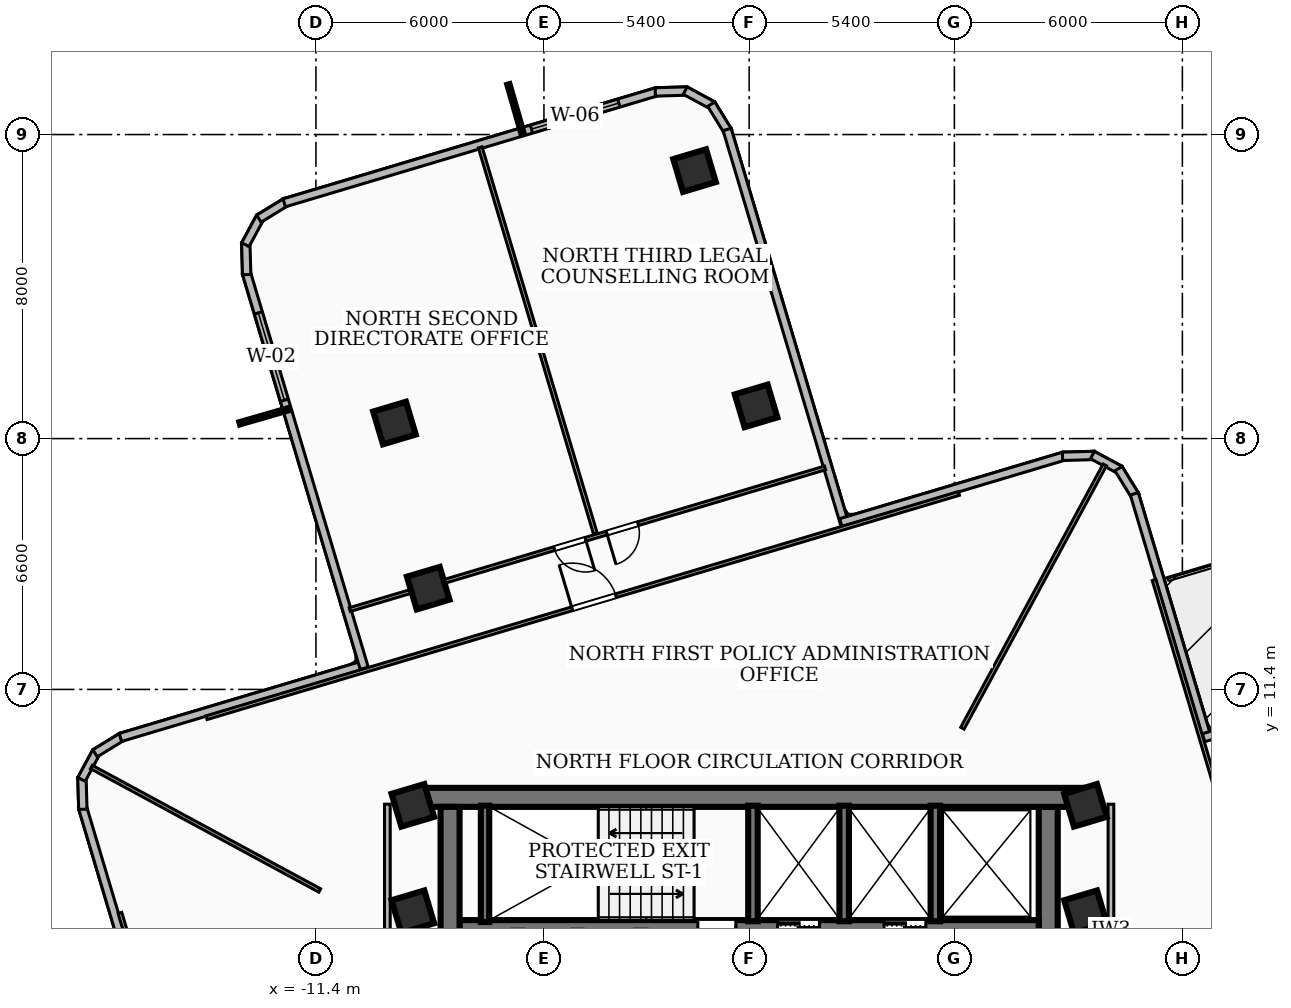
"""IFC4 building model, lengths in metres.
Left out: names, types, materials, properties, quantities, classifications, styles, units other than length and angle.
Written with IfcOpenShell. Run it as: python <this file> out.ifc"""

import sys

from ifc_helpers import new_model, si_unit, direction, frame, frame_2d, origin, origin_2d, place, context, subcontext, project, spatial, rectangle, extrude, element, fill, save


model = new_model("IFC4")
c1 = context("Model", 3, precision=1e-05, world=origin(), true_north=direction((0.0, 1.0)))
c2 = subcontext(c1, "Body", "Model", "MODEL_VIEW")
j1 = project(units=[si_unit("LENGTHUNIT", "METRE"), si_unit("PLANEANGLEUNIT", "RADIAN")], contexts=[c1])
p1 = place(None, origin())
s1 = spatial("IfcSite", under=j1, at=p1, CompositionType="ELEMENT")
p2 = place(p1, origin())
s2 = spatial("IfcBuilding", under=s1, at=p2, CompositionType="ELEMENT")
p3 = place(p2, frame((0.0, 0.0, 145.08)))
s3 = spatial("IfcBuildingStorey", under=s2, at=p3, CompositionType="ELEMENT", Elevation=145.08)
p4 = place(p3, frame((-8.78, 8.56, 0.0), z_axis=(0.0, 0.0, 1.0), x_axis=(1.0, 0.0, 0.0)))
e1 = element("IfcWall", 1, at=p4, inside=s3, PredefinedType="SHEAR", context=c2, shape_type="SweptSolid", body=[
    extrude(rectangle(XDim=17.56, YDim=0.5, at=frame_2d((8.78, 0.0))), origin(), (0.0, 0.0, 1.0), 3.32),
])
for number, where, z_axis, x_axis in (
    (2, (-7.87, 2.0, 0.0), (0.0, 0.0, 1.0), (0.0, 1.0, 0.0)),
    (3, (7.87, 8.31, 0.0), (0.0, 0.0, 1.0), (0.0, -1.0, 0.0)),
):
    element("IfcWall", number, at=place(p3, frame(where, z_axis=z_axis, x_axis=x_axis)), inside=s3, PredefinedType="SHEAR", context=c2, shape_type="SweptSolid", body=[
        extrude(rectangle(XDim=6.31, YDim=0.5, at=frame_2d((3.155, 0.0))), origin(), (0.0, 0.0, 1.0), 3.32),
    ])
p5 = place(p3, frame((7.62, 5.18, 0.0), z_axis=(0.0, 0.0, 1.0), x_axis=(-1.0, 0.0, 0.0)))
e4 = element("IfcWall", 4, at=p5, inside=s3, PredefinedType="SOLIDWALL", context=c2, shape_type="SweptSolid", body=[
    extrude(rectangle(XDim=15.24, YDim=0.3, at=frame_2d((7.62, 0.0))), origin(), (0.0, 0.0, 1.0), 3.32),
])
p6 = place(p5, frame((5.77, 0.0, 0.0)))
e5 = element("IfcOpeningElement", 5, at=p6, cuts=e4, PredefinedType="OPENING", context=c2, shape_type="SweptSolid", body=[
    extrude(rectangle(XDim=1.1, YDim=2.15, at=frame_2d((0.55, 1.075))), frame((0.0, 0.16, 0.0), z_axis=(0.0, -1.0, 0.0), x_axis=(1.0, 0.0, 0.0)), (0.0, 0.0, 1.0), 0.32),
])
p7 = place(p5, frame((2.97, 0.0, 0.0)))
e6 = element("IfcOpeningElement", 6, at=p7, cuts=e4, PredefinedType="OPENING", context=c2, shape_type="SweptSolid", body=[
    extrude(rectangle(XDim=1.1, YDim=2.15, at=frame_2d((0.55, 1.075))), frame((0.0, 0.16, 0.0), z_axis=(0.0, -1.0, 0.0), x_axis=(1.0, 0.0, 0.0)), (0.0, 0.0, 1.0), 0.32),
])
p8 = place(p5, frame((7.97, 0.0, 0.0)))
e7 = element("IfcOpeningElement", 7, at=p8, cuts=e4, PredefinedType="OPENING", context=c2, shape_type="SweptSolid", body=[
    extrude(rectangle(XDim=1.0, YDim=2.1, at=frame_2d((0.5, 1.05))), frame((0.0, 0.16, 0.0), z_axis=(0.0, -1.0, 0.0), x_axis=(1.0, 0.0, 0.0)), (0.0, 0.0, 1.0), 0.32),
])
p9 = place(p3, frame((-6.95, 5.28, 0.0), z_axis=(0.0, 0.0, 1.0), x_axis=(0.0, 1.0, 0.0)))
e8 = element("IfcWall", 8, at=p9, inside=s3, PredefinedType="SOLIDWALL", context=c2, shape_type="SweptSolid", body=[
    extrude(rectangle(XDim=3.06, YDim=0.22, at=frame_2d((1.53, 0.0))), origin(), (0.0, 0.0, 1.0), 3.32),
])
for number, where, z_axis, x_axis in (
    (9, (0.1, 5.3, 0.0), (0.0, 0.0, 1.0), (0.0, 1.0, 0.0)),
    (10, (2.5, 5.3, 0.0), (0.0, 0.0, 1.0), (0.0, 1.0, 0.0)),
    (11, (4.9, 5.3, 0.0), (0.0, 0.0, 1.0), (0.0, 1.0, 0.0)),
):
    element("IfcWall", number, at=place(p3, frame(where, z_axis=z_axis, x_axis=x_axis)), inside=s3, PredefinedType="SOLIDWALL", context=c2, shape_type="SweptSolid", body=[
        extrude(rectangle(XDim=3.04, YDim=0.25, at=frame_2d((1.52, 0.0))), origin(), (0.0, 0.0, 1.0), 3.32),
    ])
for number, where, z_axis, x_axis in (
    (12, (-8.85, 5.55, 0.0), (0.0, 0.0, 1.0), (0.958, 0.286, 0.0)),
    (13, (8.85, 5.55, 0.0), (0.0, 0.0, 1.0), (0.958, 0.286, 0.0)),
    (14, (-8.85, 8.35, 0.0), (0.0, 0.0, 1.0), (0.958, 0.286, 0.0)),
    (15, (8.85, 8.35, 0.0), (0.0, 0.0, 1.0), (0.958, 0.286, 0.0)),
    (16, (0.183, 18.86, 0.0), (0.0, 0.0, 1.0), (0.958, 0.286, 0.0)),
    (17, (-8.445, 14.064, 0.0), (0.0, 0.0, 1.0), (0.958, 0.286, 0.0)),
    (18, (-1.437, 25.052, 0.0), (0.0, 0.0, 1.0), (0.958, 0.286, 0.0)),
    (19, (-9.333, 18.409, 0.0), (0.0, 0.0, 1.0), (0.958, 0.286, 0.0)),
):
    element("IfcColumn", number, at=place(p3, frame(where, z_axis=z_axis, x_axis=x_axis)), inside=s3, PredefinedType="COLUMN", context=c2, shape_type="SweptSolid", body=[
        extrude(rectangle(XDim=0.9, YDim=0.9, at=origin_2d()), origin(), (0.0, 0.0, 1.0), 3.6),
    ])
p10 = place(p3, frame((-15.787, 2.412, 0.0), z_axis=(0.0, 0.0, 1.0), x_axis=(-0.285712854037, 0.958315274342, 0.0)))
e20 = element("IfcWall", 20, at=p10, inside=s3, PredefinedType="SOLIDWALL", context=c2, shape_type="SweptSolid", body=[
    extrude(rectangle(XDim=6.139, YDim=0.22, at=frame_2d((3.069, 0.0))), origin(), (0.0, 0.0, 1.0), 3.32),
])
p11 = place(p3, frame((-17.533, 8.246, 0.0), z_axis=(0.0, 0.0, 1.0), x_axis=(-0.028676726094, 0.999588738122, 0.0)))
e21 = element("IfcWall", 21, at=p11, inside=s3, PredefinedType="SOLIDWALL", context=c2, shape_type="SweptSolid", body=[
    extrude(rectangle(XDim=0.834, YDim=0.22, at=frame_2d((0.417, 0.0))), origin(), (0.0, 0.0, 1.0), 3.32),
])
p12 = place(p3, frame((-17.568, 9.033, 0.0), z_axis=(0.0, 0.0, 1.0), x_axis=(0.475928115507, 0.879484183411, 0.0)))
e22 = element("IfcWall", 22, at=p12, inside=s3, PredefinedType="SOLIDWALL", context=c2, shape_type="SweptSolid", body=[
    extrude(rectangle(XDim=0.82, YDim=0.22, at=frame_2d((0.41, 0.0))), origin(), (0.0, 0.0, 1.0), 3.32),
])
p13 = place(p3, frame((-17.211, 9.719, 0.0), z_axis=(0.0, 0.0, 1.0), x_axis=(0.851597982144, 0.524195456684, 0.0)))
e23 = element("IfcWall", 23, at=p13, inside=s3, PredefinedType="SOLIDWALL", context=c2, shape_type="SweptSolid", body=[
    extrude(rectangle(XDim=0.834, YDim=0.22, at=frame_2d((0.417, 0.0))), origin(), (0.0, 0.0, 1.0), 3.32),
])
p14 = place(p3, frame((-16.546, 10.136, 0.0), z_axis=(0.0, 0.0, 1.0), x_axis=(0.958346765514, 0.285607207592, 0.0)))
e24 = element("IfcWall", 24, at=p14, inside=s3, PredefinedType="SOLIDWALL", context=c2, shape_type="SweptSolid", body=[
    extrude(rectangle(XDim=6.757, YDim=0.22, at=frame_2d((3.379, 0.0))), origin(), (0.0, 0.0, 1.0), 3.32),
])
p15 = place(p3, frame((-10.129, 11.957, 0.0), z_axis=(0.0, 0.0, 1.0), x_axis=(-0.285596101976, 0.958350075148, 0.0)))
e25 = element("IfcWall", 25, at=p15, inside=s3, PredefinedType="SOLIDWALL", context=c2, shape_type="SweptSolid", body=[
    extrude(rectangle(XDim=10.858, YDim=0.22, at=frame_2d((5.429, 0.0))), origin(), (0.0, 0.0, 1.0), 3.32),
])
p16 = place(p15, frame((7.358, 0.0, 0.85)))
e26 = element("IfcOpeningElement", 26, at=p16, cuts=e25, PredefinedType="OPENING", context=c2, shape_type="SweptSolid", body=[
    extrude(rectangle(XDim=2.4, YDim=2.1, at=frame_2d((1.2, 1.05))), frame((0.0, 0.12, 0.0), z_axis=(0.0, -1.0, 0.0), x_axis=(1.0, 0.0, 0.0)), (0.0, 0.0, 1.0), 0.24),
])
p17 = place(p3, frame((-13.222, 22.314, 0.0), z_axis=(0.0, 0.0, 1.0), x_axis=(-0.028969101418, 0.999580307511, 0.0)))
e27 = element("IfcWall", 27, at=p17, inside=s3, PredefinedType="SOLIDWALL", context=c2, shape_type="SweptSolid", body=[
    extrude(rectangle(XDim=0.834, YDim=0.22, at=frame_2d((0.417, 0.0))), origin(), (0.0, 0.0, 1.0), 3.32),
])
p18 = place(p3, frame((-13.257, 23.101, 0.0), z_axis=(0.0, 0.0, 1.0), x_axis=(0.475928115507, 0.879484183411, 0.0)))
e28 = element("IfcWall", 28, at=p18, inside=s3, PredefinedType="SOLIDWALL", context=c2, shape_type="SweptSolid", body=[
    extrude(rectangle(XDim=0.82, YDim=0.22, at=frame_2d((0.41, 0.0))), origin(), (0.0, 0.0, 1.0), 3.32),
])
p19 = place(p3, frame((-12.9, 23.787, 0.0), z_axis=(0.0, 0.0, 1.0), x_axis=(0.852251459863, 0.52313234383, 0.0)))
e29 = element("IfcWall", 29, at=p19, inside=s3, PredefinedType="SOLIDWALL", context=c2, shape_type="SweptSolid", body=[
    extrude(rectangle(XDim=0.833, YDim=0.22, at=frame_2d((0.417, 0.0))), origin(), (0.0, 0.0, 1.0), 3.32),
])
p20 = place(p3, frame((-12.235, 24.203, 0.0), z_axis=(0.0, 0.0, 1.0), x_axis=(0.958315018626, 0.28571371174, 0.0)))
e30 = element("IfcWall", 30, at=p20, inside=s3, PredefinedType="SOLIDWALL", context=c2, shape_type="SweptSolid", body=[
    extrude(rectangle(XDim=10.241, YDim=0.22, at=frame_2d((5.121, 0.0))), origin(), (0.0, 0.0, 1.0), 3.32),
])
p21 = place(p20, frame((6.788, 0.0, 0.85)))
e31 = element("IfcOpeningElement", 31, at=p21, cuts=e30, PredefinedType="OPENING", context=c2, shape_type="SweptSolid", body=[
    extrude(rectangle(XDim=2.4, YDim=1.85, at=frame_2d((1.2, 0.925))), frame((0.0, 0.12, 0.0), z_axis=(0.0, -1.0, 0.0), x_axis=(1.0, 0.0, 0.0)), (0.0, 0.0, 1.0), 0.24),
])
p22 = place(p3, frame((-2.47, 27.121, 0.0), z_axis=(0.0, 0.0, 1.0), x_axis=(0.999588738122, 0.028676726094, 0.0)))
e32 = element("IfcWall", 32, at=p22, inside=s3, PredefinedType="SOLIDWALL", context=c2, shape_type="SweptSolid", body=[
    extrude(rectangle(XDim=0.834, YDim=0.22, at=frame_2d((0.417, 0.0))), origin(), (0.0, 0.0, 1.0), 3.32),
])
p23 = place(p3, frame((-1.683, 27.156, 0.0), z_axis=(0.0, 0.0, 1.0), x_axis=(0.879676210785, -0.475573090259, 0.0)))
e33 = element("IfcWall", 33, at=p23, inside=s3, PredefinedType="SOLIDWALL", context=c2, shape_type="SweptSolid", body=[
    extrude(rectangle(XDim=0.82, YDim=0.22, at=frame_2d((0.41, 0.0))), origin(), (0.0, 0.0, 1.0), 3.32),
])
p24 = place(p3, frame((-0.997, 26.799, 0.0), z_axis=(0.0, 0.0, 1.0), x_axis=(0.524195456684, -0.851597982144, 0.0)))
e34 = element("IfcWall", 34, at=p24, inside=s3, PredefinedType="SOLIDWALL", context=c2, shape_type="SweptSolid", body=[
    extrude(rectangle(XDim=0.834, YDim=0.22, at=frame_2d((0.417, 0.0))), origin(), (0.0, 0.0, 1.0), 3.32),
])
p25 = place(p3, frame((-0.58, 26.134, 0.0), z_axis=(0.0, 0.0, 1.0), x_axis=(0.285596101976, -0.958350075148, 0.0)))
e35 = element("IfcWall", 35, at=p25, inside=s3, PredefinedType="SOLIDWALL", context=c2, shape_type="SweptSolid", body=[
    extrude(rectangle(XDim=10.858, YDim=0.22, at=frame_2d((5.429, 0.0))), origin(), (0.0, 0.0, 1.0), 2.55),
])
p26 = place(p3, frame((2.412, 15.787, 0.0), z_axis=(0.0, 0.0, 1.0), x_axis=(0.958315274342, 0.285712854037, 0.0)))
e36 = element("IfcWall", 36, at=p26, inside=s3, PredefinedType="SOLIDWALL", context=c2, shape_type="SweptSolid", body=[
    extrude(rectangle(XDim=6.139, YDim=0.22, at=frame_2d((3.069, 0.0))), origin(), (0.0, 0.0, 1.0), 2.55),
])
p27 = place(p3, frame((8.246, 17.533, 0.0), z_axis=(0.0, 0.0, 1.0), x_axis=(0.999588738122, 0.028676726094, 0.0)))
e37 = element("IfcWall", 37, at=p27, inside=s3, PredefinedType="SOLIDWALL", context=c2, shape_type="SweptSolid", body=[
    extrude(rectangle(XDim=0.834, YDim=0.22, at=frame_2d((0.417, 0.0))), origin(), (0.0, 0.0, 1.0), 3.32),
])
p28 = place(p3, frame((9.033, 17.568, 0.0), z_axis=(0.0, 0.0, 1.0), x_axis=(0.879484183411, -0.475928115507, 0.0)))
e38 = element("IfcWall", 38, at=p28, inside=s3, PredefinedType="SOLIDWALL", context=c2, shape_type="SweptSolid", body=[
    extrude(rectangle(XDim=0.82, YDim=0.22, at=frame_2d((0.41, 0.0))), origin(), (0.0, 0.0, 1.0), 3.32),
])
p29 = place(p3, frame((9.719, 17.211, 0.0), z_axis=(0.0, 0.0, 1.0), x_axis=(0.524195456684, -0.851597982144, 0.0)))
e39 = element("IfcWall", 39, at=p29, inside=s3, PredefinedType="SOLIDWALL", context=c2, shape_type="SweptSolid", body=[
    extrude(rectangle(XDim=0.834, YDim=0.22, at=frame_2d((0.417, 0.0))), origin(), (0.0, 0.0, 1.0), 3.32),
])
p30 = place(p3, frame((10.136, 16.546, 0.0), z_axis=(0.0, 0.0, 1.0), x_axis=(0.285607207592, -0.958346765514, 0.0)))
e40 = element("IfcWall", 40, at=p30, inside=s3, PredefinedType="SOLIDWALL", context=c2, shape_type="SweptSolid", body=[
    extrude(rectangle(XDim=6.757, YDim=0.22, at=frame_2d((3.379, 0.0))), origin(), (0.0, 0.0, 1.0), 3.32),
])
p31 = place(p3, frame((11.957, 10.129, 0.0), z_axis=(0.0, 0.0, 1.0), x_axis=(0.958343962332, 0.285616613419, 0.0)))
e41 = element("IfcWall", 41, at=p31, inside=s3, PredefinedType="SOLIDWALL", context=c2, shape_type="SweptSolid", body=[
    extrude(rectangle(XDim=13.458, YDim=0.22, at=frame_2d((6.729, 0.0))), origin(), (0.0, 0.0, 1.0), 3.32),
])
p32 = place(p31, frame((4.4, 0.0, 0.0)))
e42 = element("IfcOpeningElement", 42, at=p32, cuts=e41, PredefinedType="OPENING", context=c2, shape_type="SweptSolid", body=[
    extrude(rectangle(XDim=1.1, YDim=2.1, at=frame_2d((0.55, 1.05))), frame((0.0, 0.12, 0.0), z_axis=(0.0, -1.0, 0.0), x_axis=(1.0, 0.0, 0.0)), (0.0, 0.0, 1.0), 0.24),
])
for number, where, z_axis, x_axis in (
    (43, (-9.52, 1.75, 0.0), (0.0, 0.0, 1.0), (0.0, 1.0, 0.0)),
    (44, (9.52, 1.75, 0.0), (0.0, 0.0, 1.0), (0.0, 1.0, 0.0)),
):
    element("IfcWall", number, at=place(p3, frame(where, z_axis=z_axis, x_axis=x_axis)), inside=s3, PredefinedType="PARTITIONING", context=c2, shape_type="SweptSolid", body=[
        extrude(rectangle(XDim=6.63, YDim=0.15, at=frame_2d((3.315, 0.0))), origin(), (0.0, 0.0, 1.0), 2.55),
    ])
p33 = place(p3, frame((5.612, 10.38, 0.0), z_axis=(0.0, 0.0, 1.0), x_axis=(0.475666815962, 0.879625534073, 0.0)))
e45 = element("IfcWall", 45, at=p33, inside=s3, PredefinedType="PARTITIONING", context=c2, shape_type="SweptSolid", body=[
    extrude(rectangle(XDim=7.875, YDim=0.1, at=frame_2d((3.938, 0.0))), origin(), (0.0, 0.0, 1.0), 2.55),
])
p34 = place(p3, frame((-11.3, 6.11, 0.0), z_axis=(0.0, 0.0, 1.0), x_axis=(-0.879653556483, 0.475614991948, 0.0)))
e46 = element("IfcWall", 46, at=p34, inside=s3, PredefinedType="PARTITIONING", context=c2, shape_type="SweptSolid", body=[
    extrude(rectangle(XDim=6.829, YDim=0.1, at=frame_2d((3.414, 0.0))), origin(), (0.0, 0.0, 1.0), 3.32),
])
p35 = place(p3, frame((10.655, 14.279, 0.0), z_axis=(0.0, 0.0, 1.0), x_axis=(0.285665949025, -0.958329257389, 0.0)))
e47 = element("IfcWall", 47, at=p35, inside=s3, PredefinedType="PARTITIONING", context=c2, shape_type="SweptSolid", body=[
    extrude(rectangle(XDim=20.66, YDim=0.1, at=frame_2d((10.33, 0.0))), origin(), (0.0, 0.0, 1.0), 2.55),
])
p36 = place(p35, frame((10.04, 0.0, 0.0)))
e48 = element("IfcOpeningElement", 48, at=p36, cuts=e47, PredefinedType="OPENING", context=c2, shape_type="SweptSolid", body=[
    extrude(rectangle(XDim=1.2, YDim=2.1, at=frame_2d((0.6, 1.05))), frame((0.0, 0.06, 0.0), z_axis=(0.0, -1.0, 0.0), x_axis=(1.0, 0.0, 0.0)), (0.0, 0.0, 1.0), 0.12),
])
p37 = place(p3, frame((-14.279, 10.655, 0.0), z_axis=(0.0, 0.0, 1.0), x_axis=(0.958329257389, 0.285665949025, 0.0)))
e49 = element("IfcWall", 49, at=p37, inside=s3, PredefinedType="PARTITIONING", context=c2, shape_type="SweptSolid", body=[
    extrude(rectangle(XDim=20.66, YDim=0.1, at=frame_2d((10.33, 0.0))), origin(), (0.0, 0.0, 1.0), 2.55),
])
p38 = place(p37, frame((10.04, 0.0, 0.0)))
e50 = element("IfcOpeningElement", 50, at=p38, cuts=e49, PredefinedType="OPENING", context=c2, shape_type="SweptSolid", body=[
    extrude(rectangle(XDim=1.2, YDim=2.1, at=frame_2d((0.6, 1.05))), frame((0.0, 0.06, 0.0), z_axis=(0.0, -1.0, 0.0), x_axis=(1.0, 0.0, 0.0)), (0.0, 0.0, 1.0), 0.12),
])
p39 = place(p3, frame((-4.044, 15.49, 0.0), z_axis=(0.0, 0.0, 1.0), x_axis=(-0.285623556367, 0.958341893088, 0.0)))
e51 = element("IfcWall", 51, at=p39, inside=s3, PredefinedType="PARTITIONING", context=c2, shape_type="SweptSolid", body=[
    extrude(rectangle(XDim=10.615, YDim=0.1, at=frame_2d((5.308, 0.0))), origin(), (0.0, 0.0, 1.0), 2.812),
])
p40 = place(p3, frame((1.996, 17.228, 0.0), z_axis=(0.0, 0.0, 1.0), x_axis=(-0.958326854981, -0.285674008308, 0.0)))
e52 = element("IfcWall", 52, at=p40, inside=s3, PredefinedType="PARTITIONING", context=c2, shape_type="SweptSolid", body=[
    extrude(rectangle(XDim=13.05, YDim=0.1, at=frame_2d((6.525, 0.0))), origin(), (0.0, 0.0, 1.0), 2.55),
])
p41 = place(p40, frame((5.135, 0.0, 0.0)))
e53 = element("IfcOpeningElement", 53, at=p41, cuts=e52, PredefinedType="OPENING", context=c2, shape_type="SweptSolid", body=[
    extrude(rectangle(XDim=0.86, YDim=2.04, at=frame_2d((0.43, 1.02))), frame((0.0, 0.06, 0.0), z_axis=(0.0, -1.0, 0.0), x_axis=(1.0, 0.0, 0.0)), (0.0, 0.0, 1.0), 0.12),
])
p42 = place(p40, frame((6.575, 0.0, 0.0)))
e54 = element("IfcOpeningElement", 54, at=p42, cuts=e52, PredefinedType="OPENING", context=c2, shape_type="SweptSolid", body=[
    extrude(rectangle(XDim=0.86, YDim=2.04, at=frame_2d((0.43, 1.02))), frame((0.0, 0.06, 0.0), z_axis=(0.0, -1.0, 0.0), x_axis=(1.0, 0.0, 0.0)), (0.0, 0.0, 1.0), 0.12),
])
p43 = place(p3, frame((-10.655, -14.279, 0.0), z_axis=(0.0, 0.0, 1.0), x_axis=(-0.285665949025, 0.958329257389, 0.0)))
e55 = element("IfcWall", 55, at=p43, inside=s3, PredefinedType="PARTITIONING", context=c2, shape_type="SweptSolid", body=[
    extrude(rectangle(XDim=20.66, YDim=0.1, at=frame_2d((10.33, 0.0))), origin(), (0.0, 0.0, 1.0), 2.55),
])
p44 = place(p43, frame((10.04, 0.0, 0.0)))
e56 = element("IfcOpeningElement", 56, at=p44, cuts=e55, PredefinedType="OPENING", context=c2, shape_type="SweptSolid", body=[
    extrude(rectangle(XDim=1.2, YDim=2.1, at=frame_2d((0.6, 1.05))), frame((0.0, 0.06, 0.0), z_axis=(0.0, -1.0, 0.0), x_axis=(1.0, 0.0, 0.0)), (0.0, 0.0, 1.0), 0.12),
])
p45 = place(p16, origin())
e57 = element("IfcWindow", 57, at=p45, inside=s3, PartitioningType="SINGLE_PANEL", PredefinedType="WINDOW", context=c2, shape_type="SweptSolid", body=[
    extrude(rectangle(XDim=2.4, YDim=2.1, at=frame_2d((1.2, 1.05))), frame((0.0, 0.03, 0.0), z_axis=(0.0, -1.0, 0.0), x_axis=(1.0, 0.0, 0.0)), (0.0, 0.0, 1.0), 0.06),
])
fill(e26, e57)
p46 = place(p21, origin())
e58 = element("IfcWindow", 58, at=p46, inside=s3, PartitioningType="SINGLE_PANEL", PredefinedType="WINDOW", context=c2, shape_type="SweptSolid", body=[
    extrude(rectangle(XDim=2.4, YDim=1.85, at=frame_2d((1.2, 0.925))), frame((0.0, 0.03, 0.0), z_axis=(0.0, -1.0, 0.0), x_axis=(1.0, 0.0, 0.0)), (0.0, 0.0, 1.0), 0.06),
])
fill(e31, e58)
p47 = place(p6, origin())
e59 = element("IfcDoor", 59, at=p47, inside=s3, OperationType="DOUBLE_DOOR_SLIDING", PredefinedType="DOOR", context=c2, shape_type="SweptSolid", body=[
    extrude(rectangle(XDim=1.1, YDim=2.15, at=frame_2d((0.55, 1.075))), frame((0.0, 0.025, 0.0), z_axis=(0.0, -1.0, 0.0), x_axis=(1.0, 0.0, 0.0)), (0.0, 0.0, 1.0), 0.05),
])
fill(e5, e59)
p48 = place(p7, origin())
e60 = element("IfcDoor", 60, at=p48, inside=s3, OperationType="DOUBLE_DOOR_SLIDING", PredefinedType="DOOR", context=c2, shape_type="SweptSolid", body=[
    extrude(rectangle(XDim=1.1, YDim=2.15, at=frame_2d((0.55, 1.075))), frame((0.0, 0.025, 0.0), z_axis=(0.0, -1.0, 0.0), x_axis=(1.0, 0.0, 0.0)), (0.0, 0.0, 1.0), 0.05),
])
fill(e6, e60)
p49 = place(p8, origin())
e61 = element("IfcDoor", 61, at=p49, inside=s3, OperationType="SINGLE_SWING_LEFT", PredefinedType="DOOR", context=c2, shape_type="SweptSolid", body=[
    extrude(rectangle(XDim=1.0, YDim=2.1, at=frame_2d((0.5, 1.05))), frame((0.0, 0.025, 0.0), z_axis=(0.0, -1.0, 0.0), x_axis=(1.0, 0.0, 0.0)), (0.0, 0.0, 1.0), 0.05),
])
fill(e7, e61)
p50 = place(p38, origin())
e62 = element("IfcDoor", 62, at=p50, inside=s3, OperationType="SINGLE_SWING_LEFT", PredefinedType="DOOR", context=c2, shape_type="SweptSolid", body=[
    extrude(rectangle(XDim=1.2, YDim=2.1, at=frame_2d((0.6, 1.05))), frame((0.0, 0.025, 0.0), z_axis=(0.0, -1.0, 0.0), x_axis=(1.0, 0.0, 0.0)), (0.0, 0.0, 1.0), 0.05),
])
fill(e50, e62)
p51 = place(p41, origin())
e63 = element("IfcDoor", 63, at=p51, inside=s3, OperationType="SINGLE_SWING_RIGHT", PredefinedType="DOOR", context=c2, shape_type="SweptSolid", body=[
    extrude(rectangle(XDim=0.86, YDim=2.04, at=frame_2d((0.43, 1.02))), frame((0.0, 0.025, 0.0), z_axis=(0.0, -1.0, 0.0), x_axis=(1.0, 0.0, 0.0)), (0.0, 0.0, 1.0), 0.05),
])
fill(e53, e63)
p52 = place(p42, origin())
e64 = element("IfcDoor", 64, at=p52, inside=s3, OperationType="SINGLE_SWING_LEFT", PredefinedType="DOOR", context=c2, shape_type="SweptSolid", body=[
    extrude(rectangle(XDim=0.86, YDim=2.04, at=frame_2d((0.43, 1.02))), frame((0.0, 0.025, 0.0), z_axis=(0.0, -1.0, 0.0), x_axis=(1.0, 0.0, 0.0)), (0.0, 0.0, 1.0), 0.05),
])
fill(e54, e64)
save(model, sys.argv[1])
